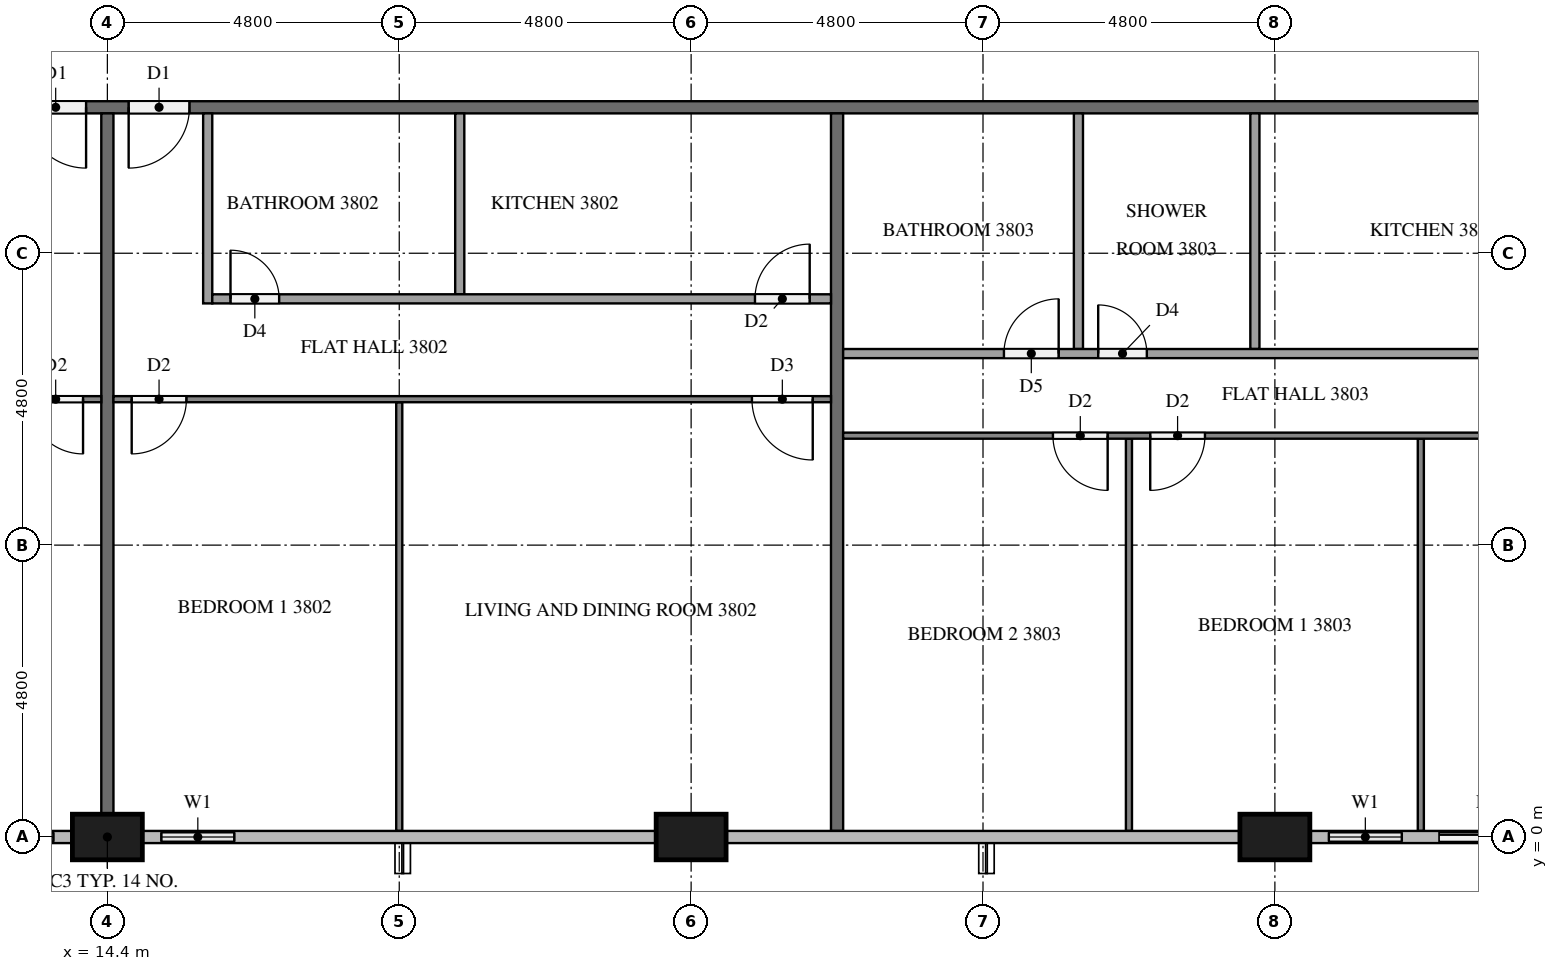
"""IFC4 building model, lengths in metres.
Left out: names, types, materials, properties, quantities, classifications, styles, units other than length and angle.
Written with IfcOpenShell. Run it as: python <this file> out.ifc"""

import sys

from ifc_helpers import new_model, si_unit, direction, frame, frame_2d, origin, origin_2d, place, context, subcontext, project, spatial, rectangle, extrude, element, fill, save


model = new_model("IFC4")
c1 = context("Model", 3, precision=1e-05, world=origin(), true_north=direction((0.0, 1.0)))
c2 = subcontext(c1, "Body", "Model", "MODEL_VIEW")
j1 = project(units=[si_unit("LENGTHUNIT", "METRE"), si_unit("PLANEANGLEUNIT", "RADIAN")], contexts=[c1])
p1 = place(None, origin())
s1 = spatial("IfcSite", under=j1, at=p1, CompositionType="ELEMENT")
p2 = place(p1, origin())
s2 = spatial("IfcBuilding", under=s1, at=p2, CompositionType="ELEMENT")
p3 = place(p2, frame((0.0, 0.0, 149.0)))
s3 = spatial("IfcBuildingStorey", under=s2, at=p3, CompositionType="ELEMENT", Elevation=149.0)
for number, where, z_axis, x_axis in (
    (1, (14.4, 0.0, 0.0), (0.0, 0.0, 1.0), (1.0, 0.0, 0.0)),
    (2, (24.0, 0.0, 0.0), (0.0, 0.0, 1.0), (1.0, 0.0, 0.0)),
    (3, (33.6, 0.0, 0.0), (0.0, 0.0, 1.0), (1.0, 0.0, 0.0)),
):
    element("IfcColumn", number, at=place(p3, frame(where, z_axis=z_axis, x_axis=x_axis)), inside=s3, PredefinedType="COLUMN", context=c2, shape_type="SweptSolid", body=[
        extrude(rectangle(XDim=1.15, YDim=0.75, at=origin_2d()), origin(), (0.0, 0.0, 1.0), 3.2),
    ])
p4 = place(p3, frame((12.0, 0.0, 0.0), z_axis=(0.0, 0.0, 1.0), x_axis=(1.0, 0.0, 0.0)))
e4 = element("IfcWall", 4, at=p4, inside=s3, PredefinedType="SOLIDWALL", context=c2, shape_type="SweptSolid", body=[
    extrude(rectangle(XDim=1.825, YDim=0.15, at=frame_2d((0.913, 0.0))), origin(), (0.0, 0.0, 1.0), 3.2),
])
p5 = place(p4, frame((0.312, 0.0, 0.9)))
e5 = element("IfcOpeningElement", 5, at=p5, cuts=e4, PredefinedType="OPENING", context=c2, shape_type="SweptSolid", body=[
    extrude(rectangle(XDim=1.2, YDim=1.4, at=frame_2d((0.6, 0.7))), frame((0.0, 0.085, 0.0), z_axis=(0.0, -1.0, 0.0), x_axis=(1.0, 0.0, 0.0)), (0.0, 0.0, 1.0), 0.17),
])
p6 = place(p3, frame((14.975, 0.0, 0.0), z_axis=(0.0, 0.0, 1.0), x_axis=(1.0, 0.0, 0.0)))
e6 = element("IfcWall", 6, at=p6, inside=s3, PredefinedType="SOLIDWALL", context=c2, shape_type="SweptSolid", body=[
    extrude(rectangle(XDim=1.825, YDim=0.15, at=frame_2d((0.913, 0.0))), origin(), (0.0, 0.0, 1.0), 3.2),
])
p7 = place(p6, frame((0.312, 0.0, 0.9)))
e7 = element("IfcOpeningElement", 7, at=p7, cuts=e6, PredefinedType="OPENING", context=c2, shape_type="SweptSolid", body=[
    extrude(rectangle(XDim=1.2, YDim=1.4, at=frame_2d((0.6, 0.7))), frame((0.0, 0.085, 0.0), z_axis=(0.0, -1.0, 0.0), x_axis=(1.0, 0.0, 0.0)), (0.0, 0.0, 1.0), 0.17),
])
p8 = place(p3, frame((34.175, 0.0, 0.0), z_axis=(0.0, 0.0, 1.0), x_axis=(1.0, 0.0, 0.0)))
e8 = element("IfcWall", 8, at=p8, inside=s3, PredefinedType="SOLIDWALL", context=c2, shape_type="SweptSolid", body=[
    extrude(rectangle(XDim=4.225, YDim=0.15, at=frame_2d((2.112, 0.0))), origin(), (0.0, 0.0, 1.0), 3.2),
])
p9 = place(p8, frame((0.312, 0.0, 0.9)))
e9 = element("IfcOpeningElement", 9, at=p9, cuts=e8, PredefinedType="OPENING", context=c2, shape_type="SweptSolid", body=[
    extrude(rectangle(XDim=1.2, YDim=1.4, at=frame_2d((0.6, 0.7))), frame((0.0, 0.085, 0.0), z_axis=(0.0, -1.0, 0.0), x_axis=(1.0, 0.0, 0.0)), (0.0, 0.0, 1.0), 0.17),
])
p10 = place(p8, frame((2.125, 0.0, 0.0)))
e10 = element("IfcOpeningElement", 10, at=p10, cuts=e8, PredefinedType="OPENING", context=c2, shape_type="SweptSolid", body=[
    extrude(rectangle(XDim=1.8, YDim=2.4, at=frame_2d((0.9, 1.2))), frame((0.0, 0.085, 0.0), z_axis=(0.0, -1.0, 0.0), x_axis=(1.0, 0.0, 0.0)), (0.0, 0.0, 1.0), 0.17),
])
p11 = place(p3, frame((50.5, 12.0, 0.0), z_axis=(0.0, 0.0, 1.0), x_axis=(-1.0, 0.0, 0.0)))
e11 = element("IfcWall", 11, at=p11, inside=s3, PredefinedType="PARTITIONING", context=c2, shape_type="SweptSolid", body=[
    extrude(rectangle(XDim=38.6, YDim=0.2, at=frame_2d((19.3, 0.0))), origin(), (0.0, 0.0, 1.0), 3.2),
])
p12 = place(p11, frame((36.45, 0.0, 0.0)))
e12 = element("IfcOpeningElement", 12, at=p12, cuts=e11, PredefinedType="OPENING", context=c2, shape_type="SweptSolid", body=[
    extrude(rectangle(XDim=1.0, YDim=2.1, at=frame_2d((0.5, 1.05))), frame((0.0, 0.11, 0.0), z_axis=(0.0, -1.0, 0.0), x_axis=(1.0, 0.0, 0.0)), (0.0, 0.0, 1.0), 0.22),
])
p13 = place(p11, frame((34.75, 0.0, 0.0)))
e13 = element("IfcOpeningElement", 13, at=p13, cuts=e11, PredefinedType="OPENING", context=c2, shape_type="SweptSolid", body=[
    extrude(rectangle(XDim=1.0, YDim=2.1, at=frame_2d((0.5, 1.05))), frame((0.0, 0.11, 0.0), z_axis=(0.0, -1.0, 0.0), x_axis=(1.0, 0.0, 0.0)), (0.0, 0.0, 1.0), 0.22),
])
p14 = place(p11, frame((10.05, 0.0, 0.0)))
e14 = element("IfcOpeningElement", 14, at=p14, cuts=e11, PredefinedType="OPENING", context=c2, shape_type="SweptSolid", body=[
    extrude(rectangle(XDim=1.0, YDim=2.1, at=frame_2d((0.5, 1.05))), frame((0.0, 0.11, 0.0), z_axis=(0.0, -1.0, 0.0), x_axis=(1.0, 0.0, 0.0)), (0.0, 0.0, 1.0), 0.22),
])
p15 = place(p11, frame((8.35, 0.0, 0.0)))
e15 = element("IfcOpeningElement", 15, at=p15, cuts=e11, PredefinedType="OPENING", context=c2, shape_type="SweptSolid", body=[
    extrude(rectangle(XDim=1.0, YDim=2.1, at=frame_2d((0.5, 1.05))), frame((0.0, 0.11, 0.0), z_axis=(0.0, -1.0, 0.0), x_axis=(1.0, 0.0, 0.0)), (0.0, 0.0, 1.0), 0.22),
])
p16 = place(p3, frame((14.4, 11.9, 0.0), z_axis=(0.0, 0.0, 1.0), x_axis=(0.0, -1.0, 0.0)))
e16 = element("IfcWall", 16, at=p16, inside=s3, PredefinedType="PARTITIONING", context=c2, shape_type="SweptSolid", body=[
    extrude(rectangle(XDim=11.525, YDim=0.2, at=frame_2d((5.762, 0.0))), origin(), (0.0, 0.0, 1.0), 3.2),
])
p17 = place(p3, frame((26.4, 11.9, 0.0), z_axis=(0.0, 0.0, 1.0), x_axis=(0.0, -1.0, 0.0)))
e17 = element("IfcWall", 17, at=p17, inside=s3, PredefinedType="PARTITIONING", context=c2, shape_type="SweptSolid", body=[
    extrude(rectangle(XDim=11.8, YDim=0.2, at=frame_2d((5.9, 0.0))), origin(), (0.0, 0.0, 1.0), 3.2),
])
p18 = place(p3, frame((14.3, 7.2, 0.0), z_axis=(0.0, 0.0, 1.0), x_axis=(-1.0, 0.0, 0.0)))
e18 = element("IfcWall", 18, at=p18, inside=s3, PredefinedType="PARTITIONING", context=c2, shape_type="SweptSolid", body=[
    extrude(rectangle(XDim=14.2, YDim=0.1, at=frame_2d((7.1, 0.0))), origin(), (0.0, 0.0, 1.0), 3.2),
])
p19 = place(p18, frame((0.3, 0.0, 0.0)))
e19 = element("IfcOpeningElement", 19, at=p19, cuts=e18, PredefinedType="OPENING", context=c2, shape_type="SweptSolid", body=[
    extrude(rectangle(XDim=0.9, YDim=2.1, at=frame_2d((0.45, 1.05))), frame((0.0, 0.06, 0.0), z_axis=(0.0, -1.0, 0.0), x_axis=(1.0, 0.0, 0.0)), (0.0, 0.0, 1.0), 0.12),
])
p20 = place(p18, frame((8.25, 0.0, 0.0)))
e20 = element("IfcOpeningElement", 20, at=p20, cuts=e18, PredefinedType="OPENING", context=c2, shape_type="SweptSolid", body=[
    extrude(rectangle(XDim=0.9, YDim=2.1, at=frame_2d((0.45, 1.05))), frame((0.0, 0.06, 0.0), z_axis=(0.0, -1.0, 0.0), x_axis=(1.0, 0.0, 0.0)), (0.0, 0.0, 1.0), 0.12),
])
p21 = place(p18, frame((9.85, 0.0, 0.0)))
e21 = element("IfcOpeningElement", 21, at=p21, cuts=e18, PredefinedType="OPENING", context=c2, shape_type="SweptSolid", body=[
    extrude(rectangle(XDim=1.0, YDim=2.1, at=frame_2d((0.5, 1.05))), frame((0.0, 0.06, 0.0), z_axis=(0.0, -1.0, 0.0), x_axis=(1.0, 0.0, 0.0)), (0.0, 0.0, 1.0), 0.12),
])
p22 = place(p3, frame((19.2, 7.15, 0.0), z_axis=(0.0, 0.0, 1.0), x_axis=(0.0, -1.0, 0.0)))
e22 = element("IfcWall", 22, at=p22, inside=s3, PredefinedType="PARTITIONING", context=c2, shape_type="SweptSolid", body=[
    extrude(rectangle(XDim=7.05, YDim=0.1, at=frame_2d((3.525, 0.0))), origin(), (0.0, 0.0, 1.0), 3.2),
])
p23 = place(p3, frame((26.3, 7.2, 0.0), z_axis=(0.0, 0.0, 1.0), x_axis=(-1.0, 0.0, 0.0)))
e23 = element("IfcWall", 23, at=p23, inside=s3, PredefinedType="PARTITIONING", context=c2, shape_type="SweptSolid", body=[
    extrude(rectangle(XDim=11.8, YDim=0.1, at=frame_2d((5.9, 0.0))), origin(), (0.0, 0.0, 1.0), 3.2),
])
p24 = place(p23, frame((10.6, 0.0, 0.0)))
e24 = element("IfcOpeningElement", 24, at=p24, cuts=e23, PredefinedType="OPENING", context=c2, shape_type="SweptSolid", body=[
    extrude(rectangle(XDim=0.9, YDim=2.1, at=frame_2d((0.45, 1.05))), frame((0.0, 0.06, 0.0), z_axis=(0.0, -1.0, 0.0), x_axis=(1.0, 0.0, 0.0)), (0.0, 0.0, 1.0), 0.12),
])
p25 = place(p23, frame((0.3, 0.0, 0.0)))
e25 = element("IfcOpeningElement", 25, at=p25, cuts=e23, PredefinedType="OPENING", context=c2, shape_type="SweptSolid", body=[
    extrude(rectangle(XDim=1.0, YDim=2.1, at=frame_2d((0.5, 1.05))), frame((0.0, 0.06, 0.0), z_axis=(0.0, -1.0, 0.0), x_axis=(1.0, 0.0, 0.0)), (0.0, 0.0, 1.0), 0.12),
])
p26 = place(p3, frame((20.195, 11.9, 0.0), z_axis=(0.0, 0.0, 1.0), x_axis=(0.0, -1.0, 0.0)))
e26 = element("IfcWall", 26, at=p26, inside=s3, PredefinedType="PARTITIONING", context=c2, shape_type="SweptSolid", body=[
    extrude(rectangle(XDim=2.975, YDim=0.15, at=frame_2d((1.487, 0.0))), origin(), (0.0, 0.0, 1.0), 3.2),
])
p27 = place(p3, frame((16.05, 11.9, 0.0), z_axis=(0.0, 0.0, 1.0), x_axis=(0.0, -1.0, 0.0)))
e27 = element("IfcWall", 27, at=p27, inside=s3, PredefinedType="PARTITIONING", context=c2, shape_type="SweptSolid", body=[
    extrude(rectangle(XDim=3.125, YDim=0.15, at=frame_2d((1.562, 0.0))), origin(), (0.0, 0.0, 1.0), 3.2),
])
p28 = place(p3, frame((16.125, 8.85, 0.0), z_axis=(0.0, 0.0, 1.0), x_axis=(1.0, 0.0, 0.0)))
e28 = element("IfcWall", 28, at=p28, inside=s3, PredefinedType="PARTITIONING", context=c2, shape_type="SweptSolid", body=[
    extrude(rectangle(XDim=10.175, YDim=0.15, at=frame_2d((5.087, 0.0))), origin(), (0.0, 0.0, 1.0), 3.2),
])
p29 = place(p28, frame((0.3, 0.0, 0.0)))
e29 = element("IfcOpeningElement", 29, at=p29, cuts=e28, PredefinedType="OPENING", context=c2, shape_type="SweptSolid", body=[
    extrude(rectangle(XDim=0.8, YDim=2.1, at=frame_2d((0.4, 1.05))), frame((0.0, 0.085, 0.0), z_axis=(0.0, -1.0, 0.0), x_axis=(1.0, 0.0, 0.0)), (0.0, 0.0, 1.0), 0.17),
])
p30 = place(p28, frame((8.925, 0.0, 0.0)))
e30 = element("IfcOpeningElement", 30, at=p30, cuts=e28, PredefinedType="OPENING", context=c2, shape_type="SweptSolid", body=[
    extrude(rectangle(XDim=0.9, YDim=2.1, at=frame_2d((0.45, 1.05))), frame((0.0, 0.085, 0.0), z_axis=(0.0, -1.0, 0.0), x_axis=(1.0, 0.0, 0.0)), (0.0, 0.0, 1.0), 0.17),
])
for number, where, z_axis, x_axis in (
    (31, (36.0, 6.55, 0.0), (0.0, 0.0, 1.0), (0.0, -1.0, 0.0)),
    (32, (31.2, 6.55, 0.0), (0.0, 0.0, 1.0), (0.0, -1.0, 0.0)),
):
    element("IfcWall", number, at=place(p3, frame(where, z_axis=z_axis, x_axis=x_axis)), inside=s3, PredefinedType="PARTITIONING", context=c2, shape_type="SweptSolid", body=[
        extrude(rectangle(XDim=6.45, YDim=0.1, at=frame_2d((3.225, 0.0))), origin(), (0.0, 0.0, 1.0), 3.2),
    ])
p31 = place(p3, frame((40.7, 6.6, 0.0), z_axis=(0.0, 0.0, 1.0), x_axis=(-1.0, 0.0, 0.0)))
e33 = element("IfcWall", 33, at=p31, inside=s3, PredefinedType="PARTITIONING", context=c2, shape_type="SweptSolid", body=[
    extrude(rectangle(XDim=14.2, YDim=0.1, at=frame_2d((7.1, 0.0))), origin(), (0.0, 0.0, 1.0), 3.2),
])
p32 = place(p31, frame((0.3, 0.0, 0.0)))
e34 = element("IfcOpeningElement", 34, at=p32, cuts=e33, PredefinedType="OPENING", context=c2, shape_type="SweptSolid", body=[
    extrude(rectangle(XDim=1.0, YDim=2.1, at=frame_2d((0.5, 1.05))), frame((0.0, 0.06, 0.0), z_axis=(0.0, -1.0, 0.0), x_axis=(1.0, 0.0, 0.0)), (0.0, 0.0, 1.0), 0.12),
])
p33 = place(p31, frame((8.25, 0.0, 0.0)))
e35 = element("IfcOpeningElement", 35, at=p33, cuts=e33, PredefinedType="OPENING", context=c2, shape_type="SweptSolid", body=[
    extrude(rectangle(XDim=0.9, YDim=2.1, at=frame_2d((0.45, 1.05))), frame((0.0, 0.06, 0.0), z_axis=(0.0, -1.0, 0.0), x_axis=(1.0, 0.0, 0.0)), (0.0, 0.0, 1.0), 0.12),
])
p34 = place(p31, frame((9.85, 0.0, 0.0)))
e36 = element("IfcOpeningElement", 36, at=p34, cuts=e33, PredefinedType="OPENING", context=c2, shape_type="SweptSolid", body=[
    extrude(rectangle(XDim=0.9, YDim=2.1, at=frame_2d((0.45, 1.05))), frame((0.0, 0.06, 0.0), z_axis=(0.0, -1.0, 0.0), x_axis=(1.0, 0.0, 0.0)), (0.0, 0.0, 1.0), 0.12),
])
for number, where, z_axis, x_axis in (
    (37, (33.271, 11.9, 0.0), (0.0, 0.0, 1.0), (0.0, -1.0, 0.0)),
    (38, (30.369, 11.9, 0.0), (0.0, 0.0, 1.0), (0.0, -1.0, 0.0)),
):
    element("IfcWall", number, at=place(p3, frame(where, z_axis=z_axis, x_axis=x_axis)), inside=s3, PredefinedType="PARTITIONING", context=c2, shape_type="SweptSolid", body=[
        extrude(rectangle(XDim=3.875, YDim=0.15, at=frame_2d((1.938, 0.0))), origin(), (0.0, 0.0, 1.0), 3.2),
    ])
p35 = place(p3, frame((26.5, 7.95, 0.0), z_axis=(0.0, 0.0, 1.0), x_axis=(1.0, 0.0, 0.0)))
e39 = element("IfcWall", 39, at=p35, inside=s3, PredefinedType="PARTITIONING", context=c2, shape_type="SweptSolid", body=[
    extrude(rectangle(XDim=12.575, YDim=0.15, at=frame_2d((6.288, 0.0))), origin(), (0.0, 0.0, 1.0), 3.2),
])
p36 = place(p35, frame((11.375, 0.0, 0.0)))
e40 = element("IfcOpeningElement", 40, at=p36, cuts=e39, PredefinedType="OPENING", context=c2, shape_type="SweptSolid", body=[
    extrude(rectangle(XDim=0.9, YDim=2.1, at=frame_2d((0.45, 1.05))), frame((0.0, 0.085, 0.0), z_axis=(0.0, -1.0, 0.0), x_axis=(1.0, 0.0, 0.0)), (0.0, 0.0, 1.0), 0.17),
])
p37 = place(p35, frame((4.194, 0.0, 0.0)))
e41 = element("IfcOpeningElement", 41, at=p37, cuts=e39, PredefinedType="OPENING", context=c2, shape_type="SweptSolid", body=[
    extrude(rectangle(XDim=0.8, YDim=2.1, at=frame_2d((0.4, 1.05))), frame((0.0, 0.085, 0.0), z_axis=(0.0, -1.0, 0.0), x_axis=(1.0, 0.0, 0.0)), (0.0, 0.0, 1.0), 0.17),
])
p38 = place(p35, frame((2.644, 0.0, 0.0)))
e42 = element("IfcOpeningElement", 42, at=p38, cuts=e39, PredefinedType="OPENING", context=c2, shape_type="SweptSolid", body=[
    extrude(rectangle(XDim=0.9, YDim=2.1, at=frame_2d((0.45, 1.05))), frame((0.0, 0.085, 0.0), z_axis=(0.0, -1.0, 0.0), x_axis=(1.0, 0.0, 0.0)), (0.0, 0.0, 1.0), 0.17),
])
p39 = place(p5, origin())
e43 = element("IfcWindow", 43, at=p39, inside=s3, PartitioningType="SINGLE_PANEL", PredefinedType="WINDOW", context=c2, shape_type="SweptSolid", body=[
    extrude(rectangle(XDim=1.2, YDim=1.4, at=frame_2d((0.6, 0.7))), frame((0.0, 0.03, 0.0), z_axis=(0.0, -1.0, 0.0), x_axis=(1.0, 0.0, 0.0)), (0.0, 0.0, 1.0), 0.06),
])
fill(e5, e43)
p40 = place(p7, origin())
e44 = element("IfcWindow", 44, at=p40, inside=s3, PartitioningType="SINGLE_PANEL", PredefinedType="WINDOW", context=c2, shape_type="SweptSolid", body=[
    extrude(rectangle(XDim=1.2, YDim=1.4, at=frame_2d((0.6, 0.7))), frame((0.0, 0.03, 0.0), z_axis=(0.0, -1.0, 0.0), x_axis=(1.0, 0.0, 0.0)), (0.0, 0.0, 1.0), 0.06),
])
fill(e7, e44)
p41 = place(p9, origin())
e45 = element("IfcWindow", 45, at=p41, inside=s3, PartitioningType="SINGLE_PANEL", PredefinedType="WINDOW", context=c2, shape_type="SweptSolid", body=[
    extrude(rectangle(XDim=1.2, YDim=1.4, at=frame_2d((0.6, 0.7))), frame((0.0, 0.03, 0.0), z_axis=(0.0, -1.0, 0.0), x_axis=(1.0, 0.0, 0.0)), (0.0, 0.0, 1.0), 0.06),
])
fill(e9, e45)
p42 = place(p10, origin())
e46 = element("IfcDoor", 46, at=p42, inside=s3, OperationType="SLIDING_TO_LEFT", PredefinedType="DOOR", context=c2, shape_type="SweptSolid", body=[
    extrude(rectangle(XDim=1.8, YDim=2.4, at=frame_2d((0.9, 1.2))), frame((0.0, 0.025, 0.0), z_axis=(0.0, -1.0, 0.0), x_axis=(1.0, 0.0, 0.0)), (0.0, 0.0, 1.0), 0.05),
])
fill(e10, e46)
p43 = place(p12, origin())
e47 = element("IfcDoor", 47, at=p43, inside=s3, OperationType="SINGLE_SWING_LEFT", PredefinedType="DOOR", context=c2, shape_type="SweptSolid", body=[
    extrude(rectangle(XDim=1.0, YDim=2.1, at=frame_2d((0.5, 1.05))), frame((0.0, 0.025, 0.0), z_axis=(0.0, -1.0, 0.0), x_axis=(1.0, 0.0, 0.0)), (0.0, 0.0, 1.0), 0.05),
])
fill(e12, e47)
p44 = place(p13, origin())
e48 = element("IfcDoor", 48, at=p44, inside=s3, OperationType="SINGLE_SWING_RIGHT", PredefinedType="DOOR", context=c2, shape_type="SweptSolid", body=[
    extrude(rectangle(XDim=1.0, YDim=2.1, at=frame_2d((0.5, 1.05))), frame((0.0, 0.025, 0.0), z_axis=(0.0, -1.0, 0.0), x_axis=(1.0, 0.0, 0.0)), (0.0, 0.0, 1.0), 0.05),
])
fill(e13, e48)
p45 = place(p19, origin())
e49 = element("IfcDoor", 49, at=p45, inside=s3, OperationType="SINGLE_SWING_LEFT", PredefinedType="DOOR", context=c2, shape_type="SweptSolid", body=[
    extrude(rectangle(XDim=0.9, YDim=2.1, at=frame_2d((0.45, 1.05))), frame((0.0, 0.025, 0.0), z_axis=(0.0, -1.0, 0.0), x_axis=(1.0, 0.0, 0.0)), (0.0, 0.0, 1.0), 0.05),
])
fill(e19, e49)
p46 = place(p24, origin())
e50 = element("IfcDoor", 50, at=p46, inside=s3, OperationType="SINGLE_SWING_RIGHT", PredefinedType="DOOR", context=c2, shape_type="SweptSolid", body=[
    extrude(rectangle(XDim=0.9, YDim=2.1, at=frame_2d((0.45, 1.05))), frame((0.0, 0.025, 0.0), z_axis=(0.0, -1.0, 0.0), x_axis=(1.0, 0.0, 0.0)), (0.0, 0.0, 1.0), 0.05),
])
fill(e24, e50)
p47 = place(p25, origin())
e51 = element("IfcDoor", 51, at=p47, inside=s3, OperationType="SINGLE_SWING_LEFT", PredefinedType="DOOR", context=c2, shape_type="SweptSolid", body=[
    extrude(rectangle(XDim=1.0, YDim=2.1, at=frame_2d((0.5, 1.05))), frame((0.0, 0.025, 0.0), z_axis=(0.0, -1.0, 0.0), x_axis=(1.0, 0.0, 0.0)), (0.0, 0.0, 1.0), 0.05),
])
fill(e25, e51)
p48 = place(p29, origin())
e52 = element("IfcDoor", 52, at=p48, inside=s3, OperationType="SINGLE_SWING_LEFT", PredefinedType="DOOR", context=c2, shape_type="SweptSolid", body=[
    extrude(rectangle(XDim=0.8, YDim=2.1, at=frame_2d((0.4, 1.05))), frame((0.0, 0.025, 0.0), z_axis=(0.0, -1.0, 0.0), x_axis=(1.0, 0.0, 0.0)), (0.0, 0.0, 1.0), 0.05),
])
fill(e29, e52)
p49 = place(p30, origin())
e53 = element("IfcDoor", 53, at=p49, inside=s3, OperationType="SINGLE_SWING_RIGHT", PredefinedType="DOOR", context=c2, shape_type="SweptSolid", body=[
    extrude(rectangle(XDim=0.9, YDim=2.1, at=frame_2d((0.45, 1.05))), frame((0.0, 0.025, 0.0), z_axis=(0.0, -1.0, 0.0), x_axis=(1.0, 0.0, 0.0)), (0.0, 0.0, 1.0), 0.05),
])
fill(e30, e53)
p50 = place(p33, origin())
e54 = element("IfcDoor", 54, at=p50, inside=s3, OperationType="SINGLE_SWING_RIGHT", PredefinedType="DOOR", context=c2, shape_type="SweptSolid", body=[
    extrude(rectangle(XDim=0.9, YDim=2.1, at=frame_2d((0.45, 1.05))), frame((0.0, 0.025, 0.0), z_axis=(0.0, -1.0, 0.0), x_axis=(1.0, 0.0, 0.0)), (0.0, 0.0, 1.0), 0.05),
])
fill(e35, e54)
p51 = place(p34, origin())
e55 = element("IfcDoor", 55, at=p51, inside=s3, OperationType="SINGLE_SWING_LEFT", PredefinedType="DOOR", context=c2, shape_type="SweptSolid", body=[
    extrude(rectangle(XDim=0.9, YDim=2.1, at=frame_2d((0.45, 1.05))), frame((0.0, 0.025, 0.0), z_axis=(0.0, -1.0, 0.0), x_axis=(1.0, 0.0, 0.0)), (0.0, 0.0, 1.0), 0.05),
])
fill(e36, e55)
p52 = place(p37, origin())
e56 = element("IfcDoor", 56, at=p52, inside=s3, OperationType="SINGLE_SWING_LEFT", PredefinedType="DOOR", context=c2, shape_type="SweptSolid", body=[
    extrude(rectangle(XDim=0.8, YDim=2.1, at=frame_2d((0.4, 1.05))), frame((0.0, 0.025, 0.0), z_axis=(0.0, -1.0, 0.0), x_axis=(1.0, 0.0, 0.0)), (0.0, 0.0, 1.0), 0.05),
])
fill(e41, e56)
p53 = place(p38, origin())
e57 = element("IfcDoor", 57, at=p53, inside=s3, OperationType="SINGLE_SWING_RIGHT", PredefinedType="DOOR", context=c2, shape_type="SweptSolid", body=[
    extrude(rectangle(XDim=0.9, YDim=2.1, at=frame_2d((0.45, 1.05))), frame((0.0, 0.025, 0.0), z_axis=(0.0, -1.0, 0.0), x_axis=(1.0, 0.0, 0.0)), (0.0, 0.0, 1.0), 0.05),
])
fill(e42, e57)
save(model, sys.argv[1])
